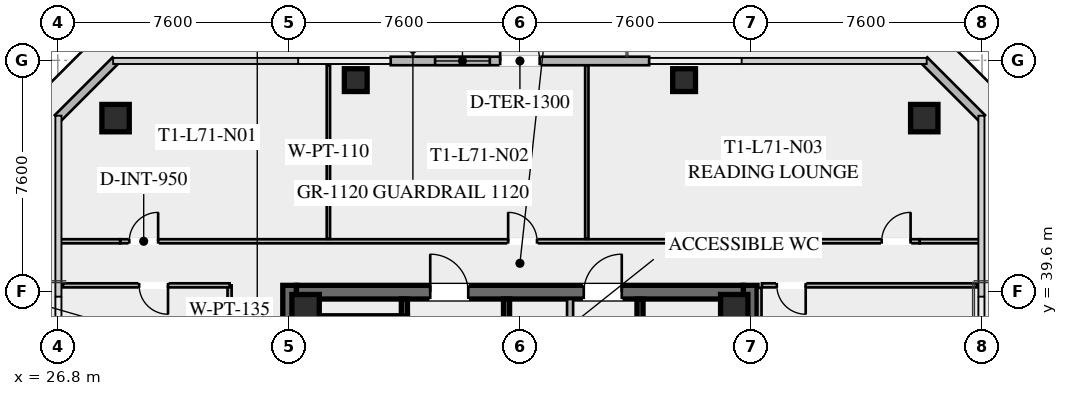
"""IFC4 building model, lengths in metres.
Left out: names, types, materials, properties, quantities, classifications, styles, units other than length and angle.
Written with IfcOpenShell. Run it as: python <this file> out.ifc"""

import sys

from ifc_helpers import new_model, si_unit, direction, frame, frame_2d, origin, origin_2d, place, context, subcontext, project, spatial, rectangle, hollow_rectangle, extrude, element, fill, save


model = new_model("IFC4")
c1 = context("Model", 3, precision=1e-05, world=origin(), true_north=direction((0.0, 1.0)))
c2 = subcontext(c1, "Body", "Model", "MODEL_VIEW")
j1 = project(units=[si_unit("LENGTHUNIT", "METRE"), si_unit("PLANEANGLEUNIT", "RADIAN")], contexts=[c1])
p1 = place(None, origin())
s1 = spatial("IfcSite", under=j1, at=p1, CompositionType="ELEMENT")
p2 = place(p1, origin())
s2 = spatial("IfcBuilding", under=s1, at=p2, CompositionType="ELEMENT")
p3 = place(p2, frame((0.0, 0.0, 263.4)))
s3 = spatial("IfcBuildingStorey", under=s2, at=p3, CompositionType="ELEMENT", Elevation=263.4)
for number, where, z_axis, x_axis in (
    (1, (34.425, 24.2, 0.0), (0.0, 0.0, 1.0), (0.0, 1.0, 0.0)),
    (2, (49.575, 39.8, 0.0), (0.0, 0.0, 1.0), (0.0, -1.0, 0.0)),
):
    element("IfcWall", number, at=place(p3, frame(where, z_axis=z_axis, x_axis=x_axis)), inside=s3, PredefinedType="SHEAR", context=c2, shape_type="SweptSolid", body=[
        extrude(rectangle(XDim=15.6, YDim=0.45, at=frame_2d((7.8, 0.0))), origin(), (0.0, 0.0, 1.0), 3.55),
    ])
p4 = place(p3, frame((34.65, 39.575, 0.0), z_axis=(0.0, 0.0, 1.0), x_axis=(1.0, 0.0, 0.0)))
e3 = element("IfcWall", 3, at=p4, inside=s3, PredefinedType="SHEAR", context=c2, shape_type="SweptSolid", body=[
    extrude(rectangle(XDim=14.7, YDim=0.45, at=frame_2d((7.35, 0.0))), origin(), (0.0, 0.0, 1.0), 3.55),
])
p5 = place(p4, frame((4.4, 0.0, 0.0)))
e4 = element("IfcOpeningElement", 4, at=p5, cuts=e3, PredefinedType="OPENING", context=c2, shape_type="SweptSolid", body=[
    extrude(rectangle(XDim=1.25, YDim=2.25, at=frame_2d((0.625, 1.125))), frame((0.0, 0.235, 0.0), z_axis=(0.0, -1.0, 0.0), x_axis=(1.0, 0.0, 0.0)), (0.0, 0.0, 1.0), 0.47),
])
p6 = place(p4, frame((9.45, 0.0, 0.0)))
e5 = element("IfcOpeningElement", 5, at=p6, cuts=e3, PredefinedType="OPENING", context=c2, shape_type="SweptSolid", body=[
    extrude(rectangle(XDim=1.25, YDim=2.25, at=frame_2d((0.625, 1.125))), frame((0.0, 0.235, 0.0), z_axis=(0.0, -1.0, 0.0), x_axis=(1.0, 0.0, 0.0)), (0.0, 0.0, 1.0), 0.47),
])
for number, where, z_axis, x_axis in (
    (6, (49.05, 39.05, 0.0), (0.0, 0.0, 1.0), (1.0, 0.0, 0.0)),
    (7, (34.95, 39.05, 0.0), (0.0, 0.0, 1.0), (1.0, 0.0, 0.0)),
):
    element("IfcColumn", number, at=place(p3, frame(where, z_axis=z_axis, x_axis=x_axis)), inside=s3, PredefinedType="COLUMN", context=c2, shape_type="SweptSolid", body=[
        extrude(hollow_rectangle(XDim=0.9, YDim=0.9, WallThickness=0.04, at=origin_2d()), origin(), (0.0, 0.0, 1.0), 3.37),
    ])
for number, where, z_axis, x_axis in (
    (8, (55.3, 45.3, -0.295), (0.0, 0.0, 1.0), (1.0, 0.0, 0.0)),
    (9, (28.7, 45.3, -0.295), (0.0, 0.0, 1.0), (1.0, 0.0, 0.0)),
):
    element("IfcColumn", number, at=place(p3, frame(where, z_axis=z_axis, x_axis=x_axis)), inside=s3, PredefinedType="COLUMN", context=c2, shape_type="SweptSolid", body=[
        extrude(hollow_rectangle(XDim=0.9, YDim=0.9, WallThickness=0.04, at=origin_2d()), origin(), (0.0, 0.0, 1.0), 3.665),
    ])
for number, where, z_axis, x_axis in (
    (10, (47.4, 46.55, -0.295), (0.0, 0.0, 1.0), (1.0, 0.0, 0.0)),
    (11, (36.6, 46.55, -0.295), (0.0, 0.0, 1.0), (1.0, 0.0, 0.0)),
):
    element("IfcColumn", number, at=place(p3, frame(where, z_axis=z_axis, x_axis=x_axis)), inside=s3, PredefinedType="COLUMN", context=c2, shape_type="SweptSolid", body=[
        extrude(hollow_rectangle(XDim=0.75, YDim=0.75, WallThickness=0.032, at=origin_2d()), origin(), (0.0, 0.0, 1.0), 3.665),
    ])
p7 = place(p3, frame((37.75, 47.18, 0.0), z_axis=(0.0, 0.0, 1.0), x_axis=(1.0, 0.0, 0.0)))
e12 = element("IfcWall", 12, at=p7, inside=s3, PredefinedType="SOLIDWALL", context=c2, shape_type="SweptSolid", body=[
    extrude(rectangle(XDim=8.5, YDim=0.28, at=frame_2d((4.25, 0.0))), origin(), (0.0, 0.0, 1.0), 3.37),
])
p8 = place(p7, frame((3.6, 0.0, 0.0)))
e13 = element("IfcOpeningElement", 13, at=p8, cuts=e12, PredefinedType="OPENING", context=c2, shape_type="SweptSolid", body=[
    extrude(rectangle(XDim=1.3, YDim=2.15, at=frame_2d((0.65, 1.075))), frame((0.0, 0.15, 0.0), z_axis=(0.0, -1.0, 0.0), x_axis=(1.0, 0.0, 0.0)), (0.0, 0.0, 1.0), 0.3),
])
p9 = place(p7, frame((1.46, 0.0, 0.85)))
e14 = element("IfcOpeningElement", 14, at=p9, cuts=e12, PredefinedType="OPENING", context=c2, shape_type="SweptSolid", body=[
    extrude(rectangle(XDim=1.8, YDim=1.92, at=frame_2d((0.9, 0.96))), frame((0.0, 0.15, 0.0), z_axis=(0.0, -1.0, 0.0), x_axis=(1.0, 0.0, 0.0)), (0.0, 0.0, 1.0), 0.3),
])
for number, where, z_axis, x_axis in (
    (15, (26.8, 45.3, 0.0), (0.0, 0.0, 1.0), (0.707, 0.707, 0.0)),
    (16, (55.3, 47.2, 0.0), (0.0, 0.0, 1.0), (0.707, -0.707, 0.0)),
):
    element("IfcWall", number, at=place(p3, frame(where, z_axis=z_axis, x_axis=x_axis)), inside=s3, PredefinedType="SOLIDWALL", context=c2, shape_type="SweptSolid", body=[
        extrude(rectangle(XDim=2.687, YDim=0.28, at=frame_2d((1.343, 0.0))), origin(), (0.0, 0.0, 1.0), 3.37),
    ])
p10 = place(p3, frame((38.2, 31.2, 0.0), z_axis=(0.0, 0.0, 1.0), x_axis=(0.0, 1.0, 0.0)))
e17 = element("IfcWall", 17, at=p10, inside=s3, PredefinedType="SHEAR", context=c2, shape_type="SweptSolid", body=[
    extrude(rectangle(XDim=8.15, YDim=0.2, at=frame_2d((4.075, 0.0))), origin(), (0.0, 0.0, 1.0), 3.37),
])
p11 = place(p10, frame((0.45, 0.0, 0.0)))
e18 = element("IfcOpeningElement", 18, at=p11, cuts=e17, PredefinedType="OPENING", context=c2, shape_type="SweptSolid", body=[
    extrude(rectangle(XDim=1.15, YDim=2.2, at=frame_2d((0.575, 1.1))), frame((0.0, 0.11, 0.0), z_axis=(0.0, -1.0, 0.0), x_axis=(1.0, 0.0, 0.0)), (0.0, 0.0, 1.0), 0.22),
])
p12 = place(p3, frame((41.56, 24.65, 0.0), z_axis=(0.0, 0.0, 1.0), x_axis=(0.0, 1.0, 0.0)))
e19 = element("IfcWall", 19, at=p12, inside=s3, PredefinedType="SHEAR", context=c2, shape_type="SweptSolid", body=[
    extrude(rectangle(XDim=14.7, YDim=0.2, at=frame_2d((7.35, 0.0))), origin(), (0.0, 0.0, 1.0), 3.37),
])
p13 = place(p3, frame((45.95, 39.35, 0.0), z_axis=(0.0, 0.0, 1.0), x_axis=(0.0, -1.0, 0.0)))
e20 = element("IfcWall", 20, at=p13, inside=s3, PredefinedType="SHEAR", context=c2, shape_type="SweptSolid", body=[
    extrude(rectangle(XDim=6.55, YDim=0.2, at=frame_2d((3.275, 0.0))), origin(), (0.0, 0.0, 1.0), 3.37),
])
p14 = place(p13, frame((5.075, 0.0, 0.0)))
e21 = element("IfcOpeningElement", 21, at=p14, cuts=e20, PredefinedType="OPENING", context=c2, shape_type="SweptSolid", body=[
    extrude(rectangle(XDim=1.1, YDim=2.2, at=frame_2d((0.55, 1.1))), frame((0.0, 0.11, 0.0), z_axis=(0.0, -1.0, 0.0), x_axis=(1.0, 0.0, 0.0)), (0.0, 0.0, 1.0), 0.22),
])
p15 = place(p13, frame((3.025, 0.0, 0.0)))
e22 = element("IfcOpeningElement", 22, at=p15, cuts=e20, PredefinedType="OPENING", context=c2, shape_type="SweptSolid", body=[
    extrude(rectangle(XDim=1.1, YDim=2.2, at=frame_2d((0.55, 1.1))), frame((0.0, 0.11, 0.0), z_axis=(0.0, -1.0, 0.0), x_axis=(1.0, 0.0, 0.0)), (0.0, 0.0, 1.0), 0.22),
])
p16 = place(p13, frame((1.025, 0.0, 0.0)))
e23 = element("IfcOpeningElement", 23, at=p16, cuts=e20, PredefinedType="OPENING", context=c2, shape_type="SweptSolid", body=[
    extrude(rectangle(XDim=1.1, YDim=2.2, at=frame_2d((0.55, 1.1))), frame((0.0, 0.11, 0.0), z_axis=(0.0, -1.0, 0.0), x_axis=(1.0, 0.0, 0.0)), (0.0, 0.0, 1.0), 0.22),
])
p17 = place(p3, frame((43.65, 32.35, 0.0), z_axis=(0.0, 0.0, 1.0), x_axis=(0.0, 1.0, 0.0)))
e24 = element("IfcWall", 24, at=p17, inside=s3, PredefinedType="SOLIDWALL", context=c2, shape_type="SweptSolid", body=[
    extrude(rectangle(XDim=7.0, YDim=0.2, at=frame_2d((3.5, 0.0))), origin(), (0.0, 0.0, 1.0), 2.723),
])
p18 = place(p17, frame((0.85, 0.0, 0.0)))
e25 = element("IfcOpeningElement", 25, at=p18, cuts=e24, PredefinedType="OPENING", context=c2, shape_type="SweptSolid", body=[
    extrude(rectangle(XDim=0.95, YDim=2.05, at=frame_2d((0.475, 1.025))), frame((0.0, 0.11, 0.0), z_axis=(0.0, -1.0, 0.0), x_axis=(1.0, 0.0, 0.0)), (0.0, 0.0, 1.0), 0.22),
])
p19 = place(p17, frame((4.85, 0.0, 0.0)))
e26 = element("IfcOpeningElement", 26, at=p19, cuts=e24, PredefinedType="OPENING", context=c2, shape_type="SweptSolid", body=[
    extrude(rectangle(XDim=0.95, YDim=2.05, at=frame_2d((0.475, 1.025))), frame((0.0, 0.11, 0.0), z_axis=(0.0, -1.0, 0.0), x_axis=(1.0, 0.0, 0.0)), (0.0, 0.0, 1.0), 0.22),
])
p20 = place(p3, frame((32.45, 35.4, 0.0), z_axis=(0.0, 0.0, 1.0), x_axis=(0.0, 1.0, 0.0)))
e27 = element("IfcWall", 27, at=p20, inside=s3, PredefinedType="PARTITIONING", context=c2, shape_type="SweptSolid", body=[
    extrude(rectangle(XDim=4.4, YDim=0.135, at=frame_2d((2.2, 0.0))), origin(), (0.0, 0.0, 1.0), 2.723),
])
p21 = place(p3, frame((28.85, 41.25, 0.0), z_axis=(0.0, 0.0, 1.0), x_axis=(1.0, 0.0, 0.0)))
e28 = element("IfcWall", 28, at=p21, inside=s3, PredefinedType="PARTITIONING", context=c2, shape_type="SweptSolid", body=[
    extrude(rectangle(XDim=26.3, YDim=0.135, at=frame_2d((13.15, 0.0))), origin(), (0.0, 0.0, 1.0), 2.723),
])
p22 = place(p21, frame((0.3, 0.0, 0.0)))
e29 = element("IfcOpeningElement", 29, at=p22, cuts=e28, PredefinedType="OPENING", context=c2, shape_type="SweptSolid", body=[
    extrude(rectangle(XDim=0.95, YDim=2.05, at=frame_2d((0.475, 1.025))), frame((0.0, 0.077, 0.0), z_axis=(0.0, -1.0, 0.0), x_axis=(1.0, 0.0, 0.0)), (0.0, 0.0, 1.0), 0.155),
])
p23 = place(p21, frame((12.763, 0.0, 0.0)))
e30 = element("IfcOpeningElement", 30, at=p23, cuts=e28, PredefinedType="OPENING", context=c2, shape_type="SweptSolid", body=[
    extrude(rectangle(XDim=0.95, YDim=2.05, at=frame_2d((0.475, 1.025))), frame((0.0, 0.077, 0.0), z_axis=(0.0, -1.0, 0.0), x_axis=(1.0, 0.0, 0.0)), (0.0, 0.0, 1.0), 0.155),
])
p24 = place(p21, frame((25.05, 0.0, 0.0)))
e31 = element("IfcOpeningElement", 31, at=p24, cuts=e28, PredefinedType="OPENING", context=c2, shape_type="SweptSolid", body=[
    extrude(rectangle(XDim=0.95, YDim=2.05, at=frame_2d((0.475, 1.025))), frame((0.0, 0.077, 0.0), z_axis=(0.0, -1.0, 0.0), x_axis=(1.0, 0.0, 0.0)), (0.0, 0.0, 1.0), 0.155),
])
for number, where, z_axis, x_axis in (
    (32, (26.82, 41.25, 0.0), (0.0, 0.0, 1.0), (1.0, 0.0, 0.0)),
    (33, (55.15, 41.25, 0.0), (0.0, 0.0, 1.0), (1.0, 0.0, 0.0)),
):
    element("IfcWall", number, at=place(p3, frame(where, z_axis=z_axis, x_axis=x_axis)), inside=s3, PredefinedType="PARTITIONING", context=c2, shape_type="SweptSolid", body=[
        extrude(rectangle(XDim=2.03, YDim=0.135, at=frame_2d((1.015, 0.0))), origin(), (0.0, 0.0, 1.0), 2.723),
    ])
for number, where, z_axis, x_axis in (
    (34, (35.7, 41.33, 0.0), (0.0, 0.0, 1.0), (0.0, 1.0, 0.0)),
    (35, (44.2, 41.33, 0.0), (0.0, 0.0, 1.0), (0.0, 1.0, 0.0)),
):
    element("IfcWall", number, at=place(p3, frame(where, z_axis=z_axis, x_axis=x_axis)), inside=s3, PredefinedType="PARTITIONING", context=c2, shape_type="SweptSolid", body=[
        extrude(rectangle(XDim=5.7, YDim=0.11, at=frame_2d((2.85, 0.0))), origin(), (0.0, 0.0, 1.0), 2.723),
    ])
p25 = place(p3, frame((49.88, 39.72, 0.0), z_axis=(0.0, 0.0, 1.0), x_axis=(0.0, -1.0, 0.0)))
e36 = element("IfcWall", 36, at=p25, inside=s3, PredefinedType="PARTITIONING", context=c2, shape_type="SweptSolid", body=[
    extrude(rectangle(XDim=15.44, YDim=0.135, at=frame_2d((7.72, 0.0))), origin(), (0.0, 0.0, 1.0), 2.723),
])
p26 = place(p3, frame((57.03, 39.8, 0.0), z_axis=(0.0, 0.0, 1.0), x_axis=(-1.0, 0.0, 0.0)))
e37 = element("IfcWall", 37, at=p26, inside=s3, PredefinedType="PARTITIONING", context=c2, shape_type="SweptSolid", body=[
    extrude(rectangle(XDim=7.07, YDim=0.135, at=frame_2d((3.535, 0.0))), origin(), (0.0, 0.0, 1.0), 2.723),
])
p27 = place(p26, frame((5.63, 0.0, 0.0)))
e38 = element("IfcOpeningElement", 38, at=p27, cuts=e37, PredefinedType="OPENING", context=c2, shape_type="SweptSolid", body=[
    extrude(rectangle(XDim=0.95, YDim=2.05, at=frame_2d((0.475, 1.025))), frame((0.0, 0.077, 0.0), z_axis=(0.0, -1.0, 0.0), x_axis=(1.0, 0.0, 0.0)), (0.0, 0.0, 1.0), 0.155),
])
p28 = place(p3, frame((32.45, 39.8, 0.0), z_axis=(0.0, 0.0, 1.0), x_axis=(-1.0, 0.0, 0.0)))
e39 = element("IfcWall", 39, at=p28, inside=s3, PredefinedType="PARTITIONING", context=c2, shape_type="SweptSolid", body=[
    extrude(rectangle(XDim=5.48, YDim=0.135, at=frame_2d((2.74, 0.0))), origin(), (0.0, 0.0, 1.0), 2.723),
])
p29 = place(p28, frame((2.025, 0.0, 0.0)))
e40 = element("IfcOpeningElement", 40, at=p29, cuts=e39, PredefinedType="OPENING", context=c2, shape_type="SweptSolid", body=[
    extrude(rectangle(XDim=0.95, YDim=2.05, at=frame_2d((0.475, 1.025))), frame((0.0, 0.077, 0.0), z_axis=(0.0, -1.0, 0.0), x_axis=(1.0, 0.0, 0.0)), (0.0, 0.0, 1.0), 0.155),
])
p30 = place(p8, origin())
e41 = element("IfcDoor", 41, at=p30, inside=s3, OperationType="SINGLE_SWING_LEFT", PredefinedType="DOOR", context=c2, shape_type="SweptSolid", body=[
    extrude(rectangle(XDim=1.3, YDim=2.15, at=frame_2d((0.65, 1.075))), frame((0.0, 0.025, 0.0), z_axis=(0.0, -1.0, 0.0), x_axis=(1.0, 0.0, 0.0)), (0.0, 0.0, 1.0), 0.05),
])
fill(e13, e41)
p31 = place(p9, origin())
e42 = element("IfcWindow", 42, at=p31, inside=s3, PartitioningType="SINGLE_PANEL", PredefinedType="WINDOW", context=c2, shape_type="SweptSolid", body=[
    extrude(rectangle(XDim=1.8, YDim=1.92, at=frame_2d((0.9, 0.96))), frame((0.0, 0.03, 0.0), z_axis=(0.0, -1.0, 0.0), x_axis=(1.0, 0.0, 0.0)), (0.0, 0.0, 1.0), 0.06),
])
fill(e14, e42)
p32 = place(p5, origin())
e43 = element("IfcDoor", 43, at=p32, inside=s3, OperationType="SINGLE_SWING_LEFT", PredefinedType="DOOR", context=c2, shape_type="SweptSolid", body=[
    extrude(rectangle(XDim=1.25, YDim=2.25, at=frame_2d((0.625, 1.125))), frame((0.0, 0.025, 0.0), z_axis=(0.0, -1.0, 0.0), x_axis=(1.0, 0.0, 0.0)), (0.0, 0.0, 1.0), 0.05),
])
fill(e4, e43)
p33 = place(p6, origin())
e44 = element("IfcDoor", 44, at=p33, inside=s3, OperationType="SINGLE_SWING_RIGHT", PredefinedType="DOOR", context=c2, shape_type="SweptSolid", body=[
    extrude(rectangle(XDim=1.25, YDim=2.25, at=frame_2d((0.625, 1.125))), frame((0.0, 0.025, 0.0), z_axis=(0.0, -1.0, 0.0), x_axis=(1.0, 0.0, 0.0)), (0.0, 0.0, 1.0), 0.05),
])
fill(e5, e44)
p34 = place(p22, origin())
e45 = element("IfcDoor", 45, at=p34, inside=s3, OperationType="SINGLE_SWING_RIGHT", PredefinedType="DOOR", context=c2, shape_type="SweptSolid", body=[
    extrude(rectangle(XDim=0.95, YDim=2.05, at=frame_2d((0.475, 1.025))), frame((0.0, 0.025, 0.0), z_axis=(0.0, -1.0, 0.0), x_axis=(1.0, 0.0, 0.0)), (0.0, 0.0, 1.0), 0.05),
])
fill(e29, e45)
p35 = place(p23, origin())
e46 = element("IfcDoor", 46, at=p35, inside=s3, OperationType="SINGLE_SWING_LEFT", PredefinedType="DOOR", context=c2, shape_type="SweptSolid", body=[
    extrude(rectangle(XDim=0.95, YDim=2.05, at=frame_2d((0.475, 1.025))), frame((0.0, 0.025, 0.0), z_axis=(0.0, -1.0, 0.0), x_axis=(1.0, 0.0, 0.0)), (0.0, 0.0, 1.0), 0.05),
])
fill(e30, e46)
p36 = place(p24, origin())
e47 = element("IfcDoor", 47, at=p36, inside=s3, OperationType="SINGLE_SWING_RIGHT", PredefinedType="DOOR", context=c2, shape_type="SweptSolid", body=[
    extrude(rectangle(XDim=0.95, YDim=2.05, at=frame_2d((0.475, 1.025))), frame((0.0, 0.025, 0.0), z_axis=(0.0, -1.0, 0.0), x_axis=(1.0, 0.0, 0.0)), (0.0, 0.0, 1.0), 0.05),
])
fill(e31, e47)
p37 = place(p27, origin())
e48 = element("IfcDoor", 48, at=p37, inside=s3, OperationType="SINGLE_SWING_LEFT", PredefinedType="DOOR", context=c2, shape_type="SweptSolid", body=[
    extrude(rectangle(XDim=0.95, YDim=2.05, at=frame_2d((0.475, 1.025))), frame((0.0, 0.025, 0.0), z_axis=(0.0, -1.0, 0.0), x_axis=(1.0, 0.0, 0.0)), (0.0, 0.0, 1.0), 0.05),
])
fill(e38, e48)
p38 = place(p29, origin())
e49 = element("IfcDoor", 49, at=p38, inside=s3, OperationType="SINGLE_SWING_LEFT", PredefinedType="DOOR", context=c2, shape_type="SweptSolid", body=[
    extrude(rectangle(XDim=0.95, YDim=2.05, at=frame_2d((0.475, 1.025))), frame((0.0, 0.025, 0.0), z_axis=(0.0, -1.0, 0.0), x_axis=(1.0, 0.0, 0.0)), (0.0, 0.0, 1.0), 0.05),
])
fill(e40, e49)
save(model, sys.argv[1])
